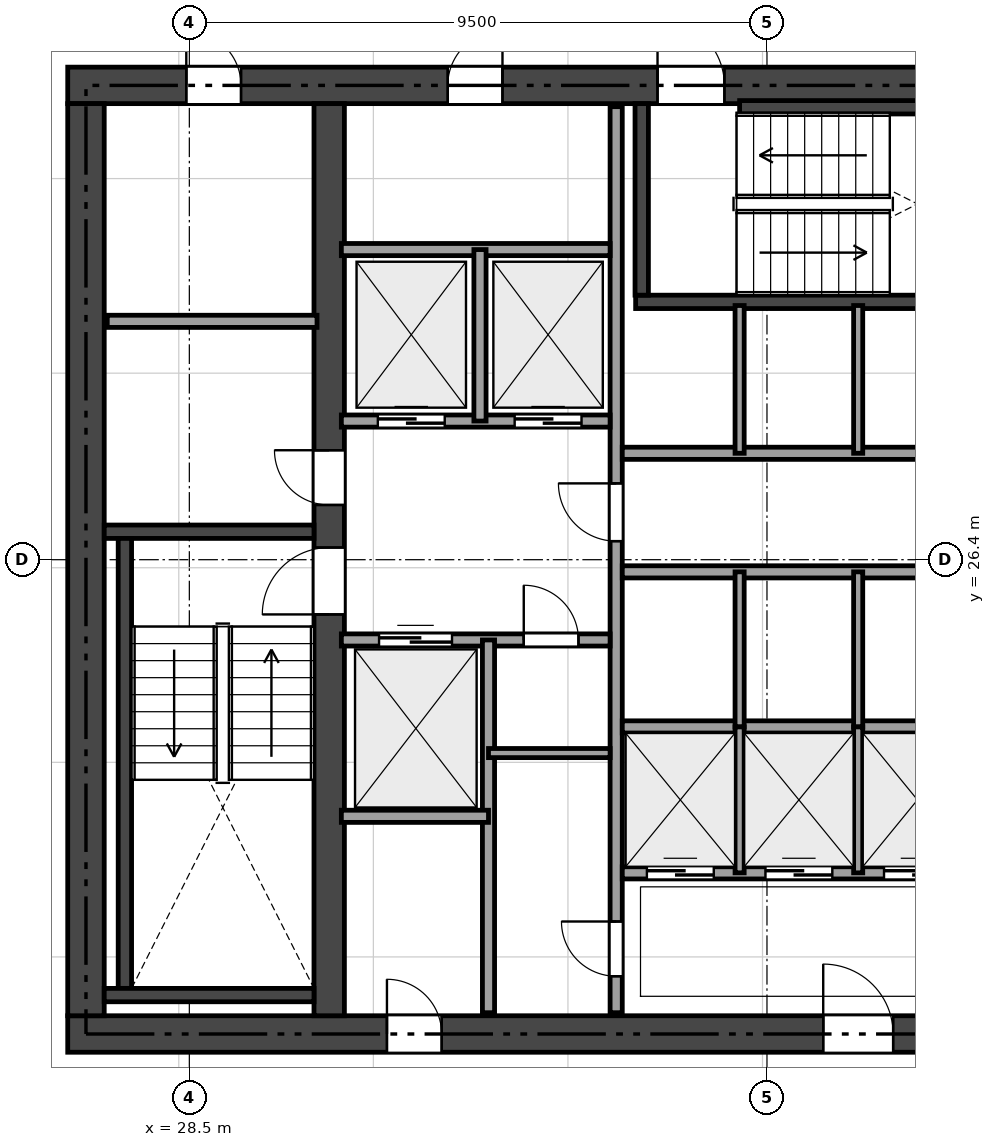
"""IFC4 building model, lengths in metres.
Left out: names, types, materials, properties, quantities, classifications, styles, units other than length and angle.
Written with IfcOpenShell. Run it as: python <this file> out.ifc"""

import sys

from ifc_helpers import new_model, si_unit, direction, frame, frame_2d, origin, place, context, subcontext, project, spatial, rectangle, extrude, element, fill, save


model = new_model("IFC4")
c1 = context("Model", 3, precision=1e-05, world=origin(), true_north=direction((0.0, 1.0)))
c2 = subcontext(c1, "Body", "Model", "MODEL_VIEW")
j1 = project(units=[si_unit("LENGTHUNIT", "METRE"), si_unit("PLANEANGLEUNIT", "RADIAN")], contexts=[c1])
p1 = place(None, origin())
s1 = spatial("IfcSite", under=j1, at=p1, CompositionType="ELEMENT")
p2 = place(p1, origin())
s2 = spatial("IfcBuilding", under=s1, at=p2, CompositionType="ELEMENT")
p3 = place(p2, frame((0.0, 0.0, 76.35)))
s3 = spatial("IfcBuildingStorey", under=s2, at=p3, CompositionType="ELEMENT", Elevation=76.35)
p4 = place(p3, frame((26.5, 18.6, 0.0), z_axis=(0.0, 0.0, 1.0), x_axis=(1.0, 0.0, 0.0)))
e1 = element("IfcWall", 1, at=p4, inside=s3, PredefinedType="SHEAR", context=c2, shape_type="SweptSolid", body=[
    extrude(rectangle(XDim=21.4, YDim=0.6, at=frame_2d((10.7, 0.0))), origin(), (0.0, 0.0, 1.0), 3.17),
])
p5 = place(p4, frame((12.425, 0.0, 0.0)))
e2 = element("IfcOpeningElement", 2, at=p5, cuts=e1, PredefinedType="OPENING", context=c2, shape_type="SweptSolid", body=[
    extrude(rectangle(XDim=1.15, YDim=2.15, at=frame_2d((0.575, 1.075))), frame((0.0, 0.31, 0.0), z_axis=(0.0, -1.0, 0.0), x_axis=(1.0, 0.0, 0.0)), (0.0, 0.0, 1.0), 0.62),
])
p6 = place(p4, frame((5.25, 0.0, 0.0)))
e3 = element("IfcOpeningElement", 3, at=p6, cuts=e1, PredefinedType="OPENING", context=c2, shape_type="SweptSolid", body=[
    extrude(rectangle(XDim=0.9, YDim=2.1, at=frame_2d((0.45, 1.05))), frame((0.0, 0.31, 0.0), z_axis=(0.0, -1.0, 0.0), x_axis=(1.0, 0.0, 0.0)), (0.0, 0.0, 1.0), 0.62),
])
p7 = place(p3, frame((26.5, 34.2, 0.0), z_axis=(0.0, 0.0, 1.0), x_axis=(1.0, 0.0, 0.0)))
e4 = element("IfcWall", 4, at=p7, inside=s3, PredefinedType="SHEAR", context=c2, shape_type="SweptSolid", body=[
    extrude(rectangle(XDim=21.4, YDim=0.6, at=frame_2d((10.7, 0.0))), origin(), (0.0, 0.0, 1.0), 3.17),
])
p8 = place(p7, frame((9.7, 0.0, 0.0)))
e5 = element("IfcOpeningElement", 5, at=p8, cuts=e4, PredefinedType="OPENING", context=c2, shape_type="SweptSolid", body=[
    extrude(rectangle(XDim=1.1, YDim=2.15, at=frame_2d((0.55, 1.075))), frame((0.0, 0.31, 0.0), z_axis=(0.0, -1.0, 0.0), x_axis=(1.0, 0.0, 0.0)), (0.0, 0.0, 1.0), 0.62),
])
p9 = place(p7, frame((1.95, 0.0, 0.0)))
e6 = element("IfcOpeningElement", 6, at=p9, cuts=e4, PredefinedType="OPENING", context=c2, shape_type="SweptSolid", body=[
    extrude(rectangle(XDim=0.9, YDim=2.1, at=frame_2d((0.45, 1.05))), frame((0.0, 0.31, 0.0), z_axis=(0.0, -1.0, 0.0), x_axis=(1.0, 0.0, 0.0)), (0.0, 0.0, 1.0), 0.62),
])
p10 = place(p7, frame((6.25, 0.0, 0.0)))
e7 = element("IfcOpeningElement", 7, at=p10, cuts=e4, PredefinedType="OPENING", context=c2, shape_type="SweptSolid", body=[
    extrude(rectangle(XDim=0.9, YDim=2.1, at=frame_2d((0.45, 1.05))), frame((0.0, 0.31, 0.0), z_axis=(0.0, -1.0, 0.0), x_axis=(1.0, 0.0, 0.0)), (0.0, 0.0, 1.0), 0.62),
])
p11 = place(p3, frame((26.8, 18.9, 0.0), z_axis=(0.0, 0.0, 1.0), x_axis=(0.0, 1.0, 0.0)))
e8 = element("IfcWall", 8, at=p11, inside=s3, PredefinedType="SHEAR", context=c2, shape_type="SweptSolid", body=[
    extrude(rectangle(XDim=15.0, YDim=0.6, at=frame_2d((7.5, 0.0))), origin(), (0.0, 0.0, 1.0), 3.17),
])
p12 = place(p3, frame((30.8, 18.9, 0.0), z_axis=(0.0, 0.0, 1.0), x_axis=(0.0, 1.0, 0.0)))
e9 = element("IfcWall", 9, at=p12, inside=s3, PredefinedType="SHEAR", context=c2, shape_type="SweptSolid", body=[
    extrude(rectangle(XDim=15.0, YDim=0.5, at=frame_2d((7.5, 0.0))), origin(), (0.0, 0.0, 1.0), 3.17),
])
p13 = place(p12, frame((6.6, 0.0, 0.0)))
e10 = element("IfcOpeningElement", 10, at=p13, cuts=e9, PredefinedType="OPENING", context=c2, shape_type="SweptSolid", body=[
    extrude(rectangle(XDim=1.1, YDim=2.15, at=frame_2d((0.55, 1.075))), frame((0.0, 0.26, 0.0), z_axis=(0.0, -1.0, 0.0), x_axis=(1.0, 0.0, 0.0)), (0.0, 0.0, 1.0), 0.52),
])
p14 = place(p12, frame((8.4, 0.0, 0.0)))
e11 = element("IfcOpeningElement", 11, at=p14, cuts=e9, PredefinedType="OPENING", context=c2, shape_type="SweptSolid", body=[
    extrude(rectangle(XDim=0.9, YDim=2.1, at=frame_2d((0.45, 1.05))), frame((0.0, 0.26, 0.0), z_axis=(0.0, -1.0, 0.0), x_axis=(1.0, 0.0, 0.0)), (0.0, 0.0, 1.0), 0.52),
])
p15 = place(p3, frame((27.1, 26.86, 0.0), z_axis=(0.0, 0.0, 1.0), x_axis=(1.0, 0.0, 0.0)))
e12 = element("IfcWall", 12, at=p15, inside=s3, PredefinedType="SHEAR", context=c2, shape_type="SweptSolid", body=[
    extrude(rectangle(XDim=3.45, YDim=0.22, at=frame_2d((1.725, 0.0))), origin(), (0.0, 0.0, 1.0), 3.17),
])
p16 = place(p3, frame((27.44, 19.35, 0.0), z_axis=(0.0, 0.0, 1.0), x_axis=(0.0, 1.0, 0.0)))
e13 = element("IfcWall", 13, at=p16, inside=s3, PredefinedType="SHEAR", context=c2, shape_type="SweptSolid", body=[
    extrude(rectangle(XDim=7.4, YDim=0.22, at=frame_2d((3.7, 0.0))), origin(), (0.0, 0.0, 1.0), 3.17),
])
p17 = place(p3, frame((27.1, 19.24, 0.0), z_axis=(0.0, 0.0, 1.0), x_axis=(1.0, 0.0, 0.0)))
e14 = element("IfcWall", 14, at=p17, inside=s3, PredefinedType="SHEAR", context=c2, shape_type="SweptSolid", body=[
    extrude(rectangle(XDim=3.45, YDim=0.22, at=frame_2d((1.725, 0.0))), origin(), (0.0, 0.0, 1.0), 3.17),
])
p18 = place(p3, frame((35.84, 30.64, 0.0), z_axis=(0.0, 0.0, 1.0), x_axis=(1.0, 0.0, 0.0)))
e15 = element("IfcWall", 15, at=p18, inside=s3, PredefinedType="SHEAR", context=c2, shape_type="SweptSolid", body=[
    extrude(rectangle(XDim=7.61, YDim=0.22, at=frame_2d((3.805, 0.0))), origin(), (0.0, 0.0, 1.0), 3.17),
])
p19 = place(p3, frame((35.94, 30.75, 0.0), z_axis=(0.0, 0.0, 1.0), x_axis=(0.0, 1.0, 0.0)))
e16 = element("IfcWall", 16, at=p19, inside=s3, PredefinedType="SHEAR", context=c2, shape_type="SweptSolid", body=[
    extrude(rectangle(XDim=3.15, YDim=0.22, at=frame_2d((1.575, 0.0))), origin(), (0.0, 0.0, 1.0), 3.17),
])
p20 = place(p3, frame((37.55, 33.84, 0.0), z_axis=(0.0, 0.0, 1.0), x_axis=(1.0, 0.0, 0.0)))
e17 = element("IfcWall", 17, at=p20, inside=s3, PredefinedType="SHEAR", context=c2, shape_type="SweptSolid", body=[
    extrude(rectangle(XDim=5.9, YDim=0.22, at=frame_2d((2.95, 0.0))), origin(), (0.0, 0.0, 1.0), 3.17),
])
p21 = place(p3, frame((27.15, 30.32, 0.0), z_axis=(0.0, 0.0, 1.0), x_axis=(1.0, 0.0, 0.0)))
e18 = element("IfcWall", 18, at=p21, inside=s3, PredefinedType="SOLIDWALL", context=c2, shape_type="SweptSolid", body=[
    extrude(rectangle(XDim=3.45, YDim=0.2, at=frame_2d((1.725, 0.0))), origin(), (0.0, 0.0, 1.0), 3.17),
])
p22 = place(p3, frame((35.52, 18.95, 0.0), z_axis=(0.0, 0.0, 1.0), x_axis=(0.0, 1.0, 0.0)))
e19 = element("IfcWall", 19, at=p22, inside=s3, PredefinedType="SOLIDWALL", context=c2, shape_type="SweptSolid", body=[
    extrude(rectangle(XDim=14.9, YDim=0.2, at=frame_2d((7.45, 0.0))), origin(), (0.0, 0.0, 1.0), 2.691),
])
p23 = place(p22, frame((7.755, 0.0, 0.0)))
e20 = element("IfcOpeningElement", 20, at=p23, cuts=e19, PredefinedType="OPENING", context=c2, shape_type="SweptSolid", body=[
    extrude(rectangle(XDim=0.95, YDim=2.15, at=frame_2d((0.475, 1.075))), frame((0.0, 0.11, 0.0), z_axis=(0.0, -1.0, 0.0), x_axis=(1.0, 0.0, 0.0)), (0.0, 0.0, 1.0), 0.22),
])
p24 = place(p22, frame((0.6, 0.0, 0.0)))
e21 = element("IfcOpeningElement", 21, at=p24, cuts=e19, PredefinedType="OPENING", context=c2, shape_type="SweptSolid", body=[
    extrude(rectangle(XDim=0.9, YDim=2.1, at=frame_2d((0.45, 1.05))), frame((0.0, 0.11, 0.0), z_axis=(0.0, -1.0, 0.0), x_axis=(1.0, 0.0, 0.0)), (0.0, 0.0, 1.0), 0.22),
])
p25 = place(p3, frame((31.0, 28.68, 0.0), z_axis=(0.0, 0.0, 1.0), x_axis=(1.0, 0.0, 0.0)))
e22 = element("IfcWall", 22, at=p25, inside=s3, PredefinedType="SOLIDWALL", context=c2, shape_type="SweptSolid", body=[
    extrude(rectangle(XDim=4.42, YDim=0.2, at=frame_2d((2.21, 0.0))), origin(), (0.0, 0.0, 1.0), 3.17),
])
p26 = place(p25, frame((0.6, 0.0, 0.0)))
e23 = element("IfcOpeningElement", 23, at=p26, cuts=e22, PredefinedType="OPENING", context=c2, shape_type="SweptSolid", body=[
    extrude(rectangle(XDim=1.1, YDim=2.15, at=frame_2d((0.55, 1.075))), frame((0.0, 0.11, 0.0), z_axis=(0.0, -1.0, 0.0), x_axis=(1.0, 0.0, 0.0)), (0.0, 0.0, 1.0), 0.22),
])
p27 = place(p25, frame((2.85, 0.0, 0.0)))
e24 = element("IfcOpeningElement", 24, at=p27, cuts=e22, PredefinedType="OPENING", context=c2, shape_type="SweptSolid", body=[
    extrude(rectangle(XDim=1.1, YDim=2.15, at=frame_2d((0.55, 1.075))), frame((0.0, 0.11, 0.0), z_axis=(0.0, -1.0, 0.0), x_axis=(1.0, 0.0, 0.0)), (0.0, 0.0, 1.0), 0.22),
])
p28 = place(p3, frame((31.0, 31.5, 0.0), z_axis=(0.0, 0.0, 1.0), x_axis=(1.0, 0.0, 0.0)))
e25 = element("IfcWall", 25, at=p28, inside=s3, PredefinedType="SOLIDWALL", context=c2, shape_type="SweptSolid", body=[
    extrude(rectangle(XDim=4.42, YDim=0.2, at=frame_2d((2.21, 0.0))), origin(), (0.0, 0.0, 1.0), 3.17),
])
p29 = place(p3, frame((33.28, 28.68, 0.0), z_axis=(0.0, 0.0, 1.0), x_axis=(0.0, 1.0, 0.0)))
e26 = element("IfcWall", 26, at=p29, inside=s3, PredefinedType="SOLIDWALL", context=c2, shape_type="SweptSolid", body=[
    extrude(rectangle(XDim=2.82, YDim=0.2, at=frame_2d((1.41, 0.0))), origin(), (0.0, 0.0, 1.0), 3.17),
])
p30 = place(p3, frame((31.0, 25.08, 0.0), z_axis=(0.0, 0.0, 1.0), x_axis=(1.0, 0.0, 0.0)))
e27 = element("IfcWall", 27, at=p30, inside=s3, PredefinedType="SOLIDWALL", context=c2, shape_type="SweptSolid", body=[
    extrude(rectangle(XDim=4.42, YDim=0.2, at=frame_2d((2.21, 0.0))), origin(), (0.0, 0.0, 1.0), 3.17),
])
p31 = place(p30, frame((3.0, 0.0, 0.0)))
e28 = element("IfcOpeningElement", 28, at=p31, cuts=e27, PredefinedType="OPENING", context=c2, shape_type="SweptSolid", body=[
    extrude(rectangle(XDim=0.9, YDim=2.1, at=frame_2d((0.45, 1.05))), frame((0.0, 0.11, 0.0), z_axis=(0.0, -1.0, 0.0), x_axis=(1.0, 0.0, 0.0)), (0.0, 0.0, 1.0), 0.22),
])
p32 = place(p30, frame((0.62, 0.0, 0.0)))
e29 = element("IfcOpeningElement", 29, at=p32, cuts=e27, PredefinedType="OPENING", context=c2, shape_type="SweptSolid", body=[
    extrude(rectangle(XDim=1.2, YDim=2.15, at=frame_2d((0.6, 1.075))), frame((0.0, 0.11, 0.0), z_axis=(0.0, -1.0, 0.0), x_axis=(1.0, 0.0, 0.0)), (0.0, 0.0, 1.0), 0.22),
])
p33 = place(p3, frame((33.42, 18.95, 0.0), z_axis=(0.0, 0.0, 1.0), x_axis=(0.0, 1.0, 0.0)))
e30 = element("IfcWall", 30, at=p33, inside=s3, PredefinedType="SOLIDWALL", context=c2, shape_type="SweptSolid", body=[
    extrude(rectangle(XDim=6.13, YDim=0.2, at=frame_2d((3.065, 0.0))), origin(), (0.0, 0.0, 1.0), 2.691),
])
p34 = place(p3, frame((31.0, 22.18, 0.0), z_axis=(0.0, 0.0, 1.0), x_axis=(1.0, 0.0, 0.0)))
e31 = element("IfcWall", 31, at=p34, inside=s3, PredefinedType="SOLIDWALL", context=c2, shape_type="SweptSolid", body=[
    extrude(rectangle(XDim=2.42, YDim=0.2, at=frame_2d((1.21, 0.0))), origin(), (0.0, 0.0, 1.0), 3.17),
])
p35 = place(p3, frame((33.42, 23.22, 0.0), z_axis=(0.0, 0.0, 1.0), x_axis=(1.0, 0.0, 0.0)))
e32 = element("IfcWall", 32, at=p35, inside=s3, PredefinedType="PARTITIONING", context=c2, shape_type="SweptSolid", body=[
    extrude(rectangle(XDim=2.0, YDim=0.15, at=frame_2d((1.0, 0.0))), origin(), (0.0, 0.0, 1.0), 3.17),
])
for number, where, z_axis, x_axis in (
    (33, (35.62, 28.15, 0.0), (0.0, 0.0, 1.0), (1.0, 0.0, 0.0)),
    (34, (35.62, 26.2, 0.0), (0.0, 0.0, 1.0), (1.0, 0.0, 0.0)),
):
    element("IfcWall", number, at=place(p3, frame(where, z_axis=z_axis, x_axis=x_axis)), inside=s3, PredefinedType="SOLIDWALL", context=c2, shape_type="SweptSolid", body=[
        extrude(rectangle(XDim=7.88, YDim=0.2, at=frame_2d((3.94, 0.0))), origin(), (0.0, 0.0, 1.0), 3.17),
    ])
p36 = place(p3, frame((35.62, 23.65, 0.0), z_axis=(0.0, 0.0, 1.0), x_axis=(1.0, 0.0, 0.0)))
e35 = element("IfcWall", 35, at=p36, inside=s3, PredefinedType="SOLIDWALL", context=c2, shape_type="SweptSolid", body=[
    extrude(rectangle(XDim=7.88, YDim=0.2, at=frame_2d((3.94, 0.0))), origin(), (0.0, 0.0, 1.0), 2.691),
])
p37 = place(p3, frame((35.62, 21.25, 0.0), z_axis=(0.0, 0.0, 1.0), x_axis=(1.0, 0.0, 0.0)))
e36 = element("IfcWall", 36, at=p37, inside=s3, PredefinedType="SOLIDWALL", context=c2, shape_type="SweptSolid", body=[
    extrude(rectangle(XDim=7.88, YDim=0.2, at=frame_2d((3.94, 0.0))), origin(), (0.0, 0.0, 1.0), 3.17),
])
p38 = place(p37, frame((0.405, 0.0, 0.0)))
e37 = element("IfcOpeningElement", 37, at=p38, cuts=e36, PredefinedType="OPENING", context=c2, shape_type="SweptSolid", body=[
    extrude(rectangle(XDim=1.1, YDim=2.15, at=frame_2d((0.55, 1.075))), frame((0.0, 0.11, 0.0), z_axis=(0.0, -1.0, 0.0), x_axis=(1.0, 0.0, 0.0)), (0.0, 0.0, 1.0), 0.22),
])
p39 = place(p37, frame((2.355, 0.0, 0.0)))
e38 = element("IfcOpeningElement", 38, at=p39, cuts=e36, PredefinedType="OPENING", context=c2, shape_type="SweptSolid", body=[
    extrude(rectangle(XDim=1.1, YDim=2.15, at=frame_2d((0.55, 1.075))), frame((0.0, 0.11, 0.0), z_axis=(0.0, -1.0, 0.0), x_axis=(1.0, 0.0, 0.0)), (0.0, 0.0, 1.0), 0.22),
])
p40 = place(p37, frame((4.305, 0.0, 0.0)))
e39 = element("IfcOpeningElement", 39, at=p40, cuts=e36, PredefinedType="OPENING", context=c2, shape_type="SweptSolid", body=[
    extrude(rectangle(XDim=1.1, YDim=2.15, at=frame_2d((0.55, 1.075))), frame((0.0, 0.11, 0.0), z_axis=(0.0, -1.0, 0.0), x_axis=(1.0, 0.0, 0.0)), (0.0, 0.0, 1.0), 0.22),
])
p41 = place(p37, frame((6.255, 0.0, 0.0)))
e40 = element("IfcOpeningElement", 40, at=p41, cuts=e36, PredefinedType="OPENING", context=c2, shape_type="SweptSolid", body=[
    extrude(rectangle(XDim=1.1, YDim=2.15, at=frame_2d((0.55, 1.075))), frame((0.0, 0.11, 0.0), z_axis=(0.0, -1.0, 0.0), x_axis=(1.0, 0.0, 0.0)), (0.0, 0.0, 1.0), 0.22),
])
for number, where, z_axis, x_axis in (
    (41, (37.55, 28.15, 0.0), (0.0, 0.0, 1.0), (0.0, 1.0, 0.0)),
    (42, (39.5, 28.15, 0.0), (0.0, 0.0, 1.0), (0.0, 1.0, 0.0)),
):
    element("IfcWall", number, at=place(p3, frame(where, z_axis=z_axis, x_axis=x_axis)), inside=s3, PredefinedType="PARTITIONING", context=c2, shape_type="SweptSolid", body=[
        extrude(rectangle(XDim=2.43, YDim=0.15, at=frame_2d((1.215, 0.0))), origin(), (0.0, 0.0, 1.0), 3.17),
    ])
for number, where, z_axis, x_axis in (
    (43, (37.55, 23.65, 0.0), (0.0, 0.0, 1.0), (0.0, 1.0, 0.0)),
    (44, (39.5, 23.65, 0.0), (0.0, 0.0, 1.0), (0.0, 1.0, 0.0)),
):
    element("IfcWall", number, at=place(p3, frame(where, z_axis=z_axis, x_axis=x_axis)), inside=s3, PredefinedType="PARTITIONING", context=c2, shape_type="SweptSolid", body=[
        extrude(rectangle(XDim=2.55, YDim=0.15, at=frame_2d((1.275, 0.0))), origin(), (0.0, 0.0, 1.0), 2.691),
    ])
for number, where, z_axis, x_axis in (
    (45, (37.55, 21.25, 0.0), (0.0, 0.0, 1.0), (0.0, 1.0, 0.0)),
    (46, (39.5, 21.25, 0.0), (0.0, 0.0, 1.0), (0.0, 1.0, 0.0)),
):
    element("IfcWall", number, at=place(p3, frame(where, z_axis=z_axis, x_axis=x_axis)), inside=s3, PredefinedType="PARTITIONING", context=c2, shape_type="SweptSolid", body=[
        extrude(rectangle(XDim=2.4, YDim=0.15, at=frame_2d((1.2, 0.0))), origin(), (0.0, 0.0, 1.0), 2.691),
    ])
p42 = place(p13, origin())
e47 = element("IfcDoor", 47, at=p42, inside=s3, OperationType="SINGLE_SWING_LEFT", PredefinedType="DOOR", context=c2, shape_type="SweptSolid", body=[
    extrude(rectangle(XDim=1.1, YDim=2.15, at=frame_2d((0.55, 1.075))), frame((0.0, 0.025, 0.0), z_axis=(0.0, -1.0, 0.0), x_axis=(1.0, 0.0, 0.0)), (0.0, 0.0, 1.0), 0.05),
])
fill(e10, e47)
p43 = place(p8, origin())
e48 = element("IfcDoor", 48, at=p43, inside=s3, OperationType="SINGLE_SWING_LEFT", PredefinedType="DOOR", context=c2, shape_type="SweptSolid", body=[
    extrude(rectangle(XDim=1.1, YDim=2.15, at=frame_2d((0.55, 1.075))), frame((0.0, 0.025, 0.0), z_axis=(0.0, -1.0, 0.0), x_axis=(1.0, 0.0, 0.0)), (0.0, 0.0, 1.0), 0.05),
])
fill(e5, e48)
p44 = place(p23, origin())
e49 = element("IfcDoor", 49, at=p44, inside=s3, OperationType="SINGLE_SWING_RIGHT", PredefinedType="DOOR", context=c2, shape_type="SweptSolid", body=[
    extrude(rectangle(XDim=0.95, YDim=2.15, at=frame_2d((0.475, 1.075))), frame((0.0, 0.025, 0.0), z_axis=(0.0, -1.0, 0.0), x_axis=(1.0, 0.0, 0.0)), (0.0, 0.0, 1.0), 0.05),
])
fill(e20, e49)
p45 = place(p5, origin())
e50 = element("IfcDoor", 50, at=p45, inside=s3, OperationType="SINGLE_SWING_LEFT", PredefinedType="DOOR", context=c2, shape_type="SweptSolid", body=[
    extrude(rectangle(XDim=1.15, YDim=2.15, at=frame_2d((0.575, 1.075))), frame((0.0, 0.025, 0.0), z_axis=(0.0, -1.0, 0.0), x_axis=(1.0, 0.0, 0.0)), (0.0, 0.0, 1.0), 0.05),
])
fill(e2, e50)
p46 = place(p14, origin())
e51 = element("IfcDoor", 51, at=p46, inside=s3, OperationType="SINGLE_SWING_RIGHT", PredefinedType="DOOR", context=c2, shape_type="SweptSolid", body=[
    extrude(rectangle(XDim=0.9, YDim=2.1, at=frame_2d((0.45, 1.05))), frame((0.0, 0.025, 0.0), z_axis=(0.0, -1.0, 0.0), x_axis=(1.0, 0.0, 0.0)), (0.0, 0.0, 1.0), 0.05),
])
fill(e11, e51)
p47 = place(p9, origin())
e52 = element("IfcDoor", 52, at=p47, inside=s3, OperationType="SINGLE_SWING_LEFT", PredefinedType="DOOR", context=c2, shape_type="SweptSolid", body=[
    extrude(rectangle(XDim=0.9, YDim=2.1, at=frame_2d((0.45, 1.05))), frame((0.0, 0.025, 0.0), z_axis=(0.0, -1.0, 0.0), x_axis=(1.0, 0.0, 0.0)), (0.0, 0.0, 1.0), 0.05),
])
fill(e6, e52)
p48 = place(p10, origin())
e53 = element("IfcDoor", 53, at=p48, inside=s3, OperationType="SINGLE_SWING_RIGHT", PredefinedType="DOOR", context=c2, shape_type="SweptSolid", body=[
    extrude(rectangle(XDim=0.9, YDim=2.1, at=frame_2d((0.45, 1.05))), frame((0.0, 0.025, 0.0), z_axis=(0.0, -1.0, 0.0), x_axis=(1.0, 0.0, 0.0)), (0.0, 0.0, 1.0), 0.05),
])
fill(e7, e53)
p49 = place(p6, origin())
e54 = element("IfcDoor", 54, at=p49, inside=s3, OperationType="SINGLE_SWING_LEFT", PredefinedType="DOOR", context=c2, shape_type="SweptSolid", body=[
    extrude(rectangle(XDim=0.9, YDim=2.1, at=frame_2d((0.45, 1.05))), frame((0.0, 0.025, 0.0), z_axis=(0.0, -1.0, 0.0), x_axis=(1.0, 0.0, 0.0)), (0.0, 0.0, 1.0), 0.05),
])
fill(e3, e54)
p50 = place(p24, origin())
e55 = element("IfcDoor", 55, at=p50, inside=s3, OperationType="SINGLE_SWING_RIGHT", PredefinedType="DOOR", context=c2, shape_type="SweptSolid", body=[
    extrude(rectangle(XDim=0.9, YDim=2.1, at=frame_2d((0.45, 1.05))), frame((0.0, 0.025, 0.0), z_axis=(0.0, -1.0, 0.0), x_axis=(1.0, 0.0, 0.0)), (0.0, 0.0, 1.0), 0.05),
])
fill(e21, e55)
p51 = place(p31, origin())
e56 = element("IfcDoor", 56, at=p51, inside=s3, OperationType="SINGLE_SWING_LEFT", PredefinedType="DOOR", context=c2, shape_type="SweptSolid", body=[
    extrude(rectangle(XDim=0.9, YDim=2.1, at=frame_2d((0.45, 1.05))), frame((0.0, 0.025, 0.0), z_axis=(0.0, -1.0, 0.0), x_axis=(1.0, 0.0, 0.0)), (0.0, 0.0, 1.0), 0.05),
])
fill(e28, e56)
p52 = place(p26, origin())
e57 = element("IfcDoor", 57, at=p52, inside=s3, OperationType="SLIDING_TO_LEFT", PredefinedType="DOOR", context=c2, shape_type="SweptSolid", body=[
    extrude(rectangle(XDim=1.1, YDim=2.15, at=frame_2d((0.55, 1.075))), frame((0.0, 0.025, 0.0), z_axis=(0.0, -1.0, 0.0), x_axis=(1.0, 0.0, 0.0)), (0.0, 0.0, 1.0), 0.05),
])
fill(e23, e57)
p53 = place(p27, origin())
e58 = element("IfcDoor", 58, at=p53, inside=s3, OperationType="SLIDING_TO_LEFT", PredefinedType="DOOR", context=c2, shape_type="SweptSolid", body=[
    extrude(rectangle(XDim=1.1, YDim=2.15, at=frame_2d((0.55, 1.075))), frame((0.0, 0.025, 0.0), z_axis=(0.0, -1.0, 0.0), x_axis=(1.0, 0.0, 0.0)), (0.0, 0.0, 1.0), 0.05),
])
fill(e24, e58)
p54 = place(p32, origin())
e59 = element("IfcDoor", 59, at=p54, inside=s3, OperationType="SLIDING_TO_LEFT", PredefinedType="DOOR", context=c2, shape_type="SweptSolid", body=[
    extrude(rectangle(XDim=1.2, YDim=2.15, at=frame_2d((0.6, 1.075))), frame((0.0, 0.025, 0.0), z_axis=(0.0, -1.0, 0.0), x_axis=(1.0, 0.0, 0.0)), (0.0, 0.0, 1.0), 0.05),
])
fill(e29, e59)
p55 = place(p38, origin())
e60 = element("IfcDoor", 60, at=p55, inside=s3, OperationType="SLIDING_TO_LEFT", PredefinedType="DOOR", context=c2, shape_type="SweptSolid", body=[
    extrude(rectangle(XDim=1.1, YDim=2.15, at=frame_2d((0.55, 1.075))), frame((0.0, 0.025, 0.0), z_axis=(0.0, -1.0, 0.0), x_axis=(1.0, 0.0, 0.0)), (0.0, 0.0, 1.0), 0.05),
])
fill(e37, e60)
p56 = place(p39, origin())
e61 = element("IfcDoor", 61, at=p56, inside=s3, OperationType="SLIDING_TO_LEFT", PredefinedType="DOOR", context=c2, shape_type="SweptSolid", body=[
    extrude(rectangle(XDim=1.1, YDim=2.15, at=frame_2d((0.55, 1.075))), frame((0.0, 0.025, 0.0), z_axis=(0.0, -1.0, 0.0), x_axis=(1.0, 0.0, 0.0)), (0.0, 0.0, 1.0), 0.05),
])
fill(e38, e61)
p57 = place(p40, origin())
e62 = element("IfcDoor", 62, at=p57, inside=s3, OperationType="SLIDING_TO_LEFT", PredefinedType="DOOR", context=c2, shape_type="SweptSolid", body=[
    extrude(rectangle(XDim=1.1, YDim=2.15, at=frame_2d((0.55, 1.075))), frame((0.0, 0.025, 0.0), z_axis=(0.0, -1.0, 0.0), x_axis=(1.0, 0.0, 0.0)), (0.0, 0.0, 1.0), 0.05),
])
fill(e39, e62)
save(model, sys.argv[1])
